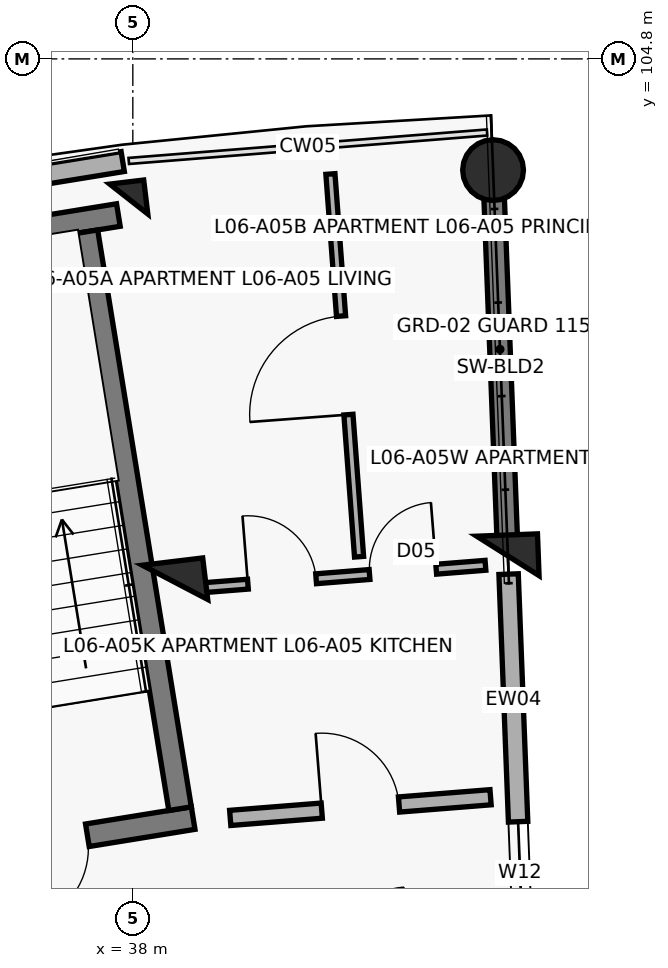
"""IFC4 building model, lengths in metres.
Left out: names, types, materials, properties, quantities, classifications, styles, units other than length and angle.
Written with IfcOpenShell. Run it as: python <this file> out.ifc"""

import sys

from ifc_helpers import new_model, si_unit, direction, frame, frame_2d, origin, origin_2d, place, context, subcontext, project, spatial, rectangle, circle, extrude, element, fill, save


model = new_model("IFC4")
c1 = context("Model", 3, precision=1e-05, world=origin(), true_north=direction((0.0, 1.0)))
c2 = subcontext(c1, "Body", "Model", "MODEL_VIEW")
j1 = project(units=[si_unit("LENGTHUNIT", "METRE"), si_unit("PLANEANGLEUNIT", "RADIAN")], contexts=[c1])
p1 = place(None, origin())
s1 = spatial("IfcSite", under=j1, at=p1, CompositionType="ELEMENT")
p2 = place(p1, origin())
s2 = spatial("IfcBuilding", under=s1, at=p2, CompositionType="ELEMENT")
p3 = place(p2, frame((0.0, 0.0, 20.5)))
s3 = spatial("IfcBuildingStorey", under=s2, at=p3, CompositionType="ELEMENT", Elevation=20.5)
p4 = place(p3, frame((38.555, 97.913, 0.0), z_axis=(0.0, 0.0, 1.0), x_axis=(-0.119790293837, 0.992799217114, 0.0)))
e1 = element("IfcColumn", 1, at=p4, inside=s3, PredefinedType="COLUMN", context=c2, shape_type="SweptSolid", body=[
    extrude(rectangle(XDim=0.55, YDim=0.8, at=origin_2d()), origin(), (0.0, 0.0, 1.0), 3.1),
])
p5 = place(p3, frame((37.947, 102.956, 0.0), z_axis=(0.0, 0.0, 1.0), x_axis=(-0.119790293837, 0.992799217114, 0.0)))
e2 = element("IfcColumn", 2, at=p5, inside=s3, PredefinedType="COLUMN", context=c2, shape_type="SweptSolid", body=[
    extrude(rectangle(XDim=0.45, YDim=0.45, at=origin_2d()), origin(), (0.0, 0.0, 1.0), 3.1),
])
p6 = place(p3, frame((42.935, 98.26, 0.0), z_axis=(0.0, 0.0, 1.0), x_axis=(-0.038387809088, 0.999262916411, 0.0)))
e3 = element("IfcColumn", 3, at=p6, inside=s3, PredefinedType="COLUMN", context=c2, shape_type="SweptSolid", body=[
    extrude(rectangle(XDim=0.55, YDim=0.8, at=origin_2d()), origin(), (0.0, 0.0, 1.0), 3.1),
])
p7 = place(p3, frame((42.74, 103.337, 0.0), z_axis=(0.0, 0.0, 1.0), x_axis=(-0.038387809088, 0.999262916411, 0.0)))
e4 = element("IfcColumn", 4, at=p7, inside=s3, PredefinedType="COLUMN", context=c2, shape_type="SweptSolid", body=[
    extrude(circle(Radius=0.4, at=origin_2d()), origin(), (0.0, 0.0, 1.0), 3.1),
])
p8 = place(p3, frame((42.928, 98.44, 0.0), z_axis=(0.0, 0.0, 1.0), x_axis=(-0.038379487611, 0.999263236055, 0.0)))
e5 = element("IfcWall", 5, at=p8, inside=s3, PredefinedType="SHEAR", context=c2, shape_type="SweptSolid", body=[
    extrude(rectangle(XDim=4.72, YDim=0.27, at=frame_2d((2.36, 0.0))), origin(), (0.0, 0.0, 1.0), 2.86),
])
p9 = place(p3, frame((33.12, 102.679, 0.0), z_axis=(0.0, 0.0, 1.0), x_axis=(0.987080750493, 0.160223568819, 0.0)))
e6 = element("IfcWall", 6, at=p9, inside=s3, PredefinedType="SOLIDWALL", context=c2, shape_type="SweptSolid", body=[
    extrude(rectangle(XDim=4.809, YDim=0.265, at=frame_2d((2.404, 0.0))), origin(), (0.0, 0.0, 1.0), 2.25),
])
p10 = place(p3, frame((43.259, 89.827, 0.0), z_axis=(0.0, 0.0, 1.0), x_axis=(-0.038407966241, 0.999262141847, 0.0)))
e7 = element("IfcWall", 7, at=p10, inside=s3, PredefinedType="SOLIDWALL", context=c2, shape_type="SweptSolid", body=[
    extrude(rectangle(XDim=8.2, YDim=0.255, at=frame_2d((4.1, 0.0))), origin(), (0.0, 0.0, 1.0), 2.18),
])
p11 = place(p10, frame((3.59, 0.0, 0.75)))
e8 = element("IfcOpeningElement", 8, at=p11, cuts=e7, PredefinedType="OPENING", context=c2, shape_type="SweptSolid", body=[
    extrude(rectangle(XDim=1.35, YDim=1.35, at=frame_2d((0.675, 0.675))), frame((0.0, 0.137, 0.0), z_axis=(0.0, -1.0, 0.0), x_axis=(1.0, 0.0, 0.0)), (0.0, 0.0, 1.0), 0.275),
])
p12 = place(p3, frame((38.794, 94.811, 0.0), z_axis=(0.0, 0.0, 1.0), x_axis=(-0.987077443397, -0.160243941341, 0.0)))
e9 = element("IfcWall", 9, at=p12, inside=s3, PredefinedType="SHEAR", context=c2, shape_type="SweptSolid", body=[
    extrude(rectangle(XDim=3.87, YDim=0.3, at=frame_2d((1.935, 0.0))), origin(), (0.0, 0.0, 1.0), 3.1),
])
p13 = place(p12, frame((1.41, 0.0, 0.0)))
e10 = element("IfcOpeningElement", 10, at=p13, cuts=e9, PredefinedType="OPENING", context=c2, shape_type="SweptSolid", body=[
    extrude(rectangle(XDim=1.05, YDim=2.15, at=frame_2d((0.525, 1.075))), frame((0.0, 0.16, 0.0), z_axis=(0.0, -1.0, 0.0), x_axis=(1.0, 0.0, 0.0)), (0.0, 0.0, 1.0), 0.32),
])
p14 = place(p3, frame((37.81, 102.745, 0.0), z_axis=(0.0, 0.0, 1.0), x_axis=(-0.987084710126, -0.160199173019, 0.0)))
e11 = element("IfcWall", 11, at=p14, inside=s3, PredefinedType="SHEAR", context=c2, shape_type="SweptSolid", body=[
    extrude(rectangle(XDim=4.47, YDim=0.3, at=frame_2d((2.235, 0.0))), origin(), (0.0, 0.0, 1.0), 3.1),
])
p15 = place(p3, frame((38.622, 94.935, 0.0), z_axis=(0.0, 0.0, 1.0), x_axis=(-0.160196564502, 0.987085133472, 0.0)))
e12 = element("IfcWall", 12, at=p15, inside=s3, PredefinedType="SHEAR", context=c2, shape_type="SweptSolid", body=[
    extrude(rectangle(XDim=7.69, YDim=0.3, at=frame_2d((3.845, 0.0))), origin(), (0.0, 0.0, 1.0), 3.1),
])
p16 = place(p3, frame((39.281, 94.813, 0.0), z_axis=(0.0, 0.0, 1.0), x_axis=(0.996862545573, 0.079152165058, 0.0)))
e13 = element("IfcWall", 13, at=p16, inside=s3, PredefinedType="SOLIDWALL", context=c2, shape_type="SweptSolid", body=[
    extrude(rectangle(XDim=3.436, YDim=0.2, at=frame_2d((1.718, 0.0))), origin(), (0.0, 0.0, 1.0), 2.08),
])
p17 = place(p16, frame((1.208, 0.0, 0.0)))
e14 = element("IfcOpeningElement", 14, at=p17, cuts=e13, PredefinedType="OPENING", context=c2, shape_type="SweptSolid", body=[
    extrude(rectangle(XDim=1.02, YDim=2.15, at=frame_2d((0.51, 1.075))), frame((0.0, 0.11, 0.0), z_axis=(0.0, -1.0, 0.0), x_axis=(1.0, 0.0, 0.0)), (0.0, 0.0, 1.0), 0.22),
])
p18 = place(p3, frame((38.866, 97.837, 0.0), z_axis=(0.0, 0.0, 1.0), x_axis=(0.996863292793, 0.079142753818, 0.0)))
e15 = element("IfcWall", 15, at=p18, inside=s3, PredefinedType="PARTITIONING", context=c2, shape_type="SweptSolid", body=[
    extrude(rectangle(XDim=3.785, YDim=0.13, at=frame_2d((1.893, 0.0))), origin(), (0.0, 0.0, 1.0), 2.08),
])
p19 = place(p18, frame((0.65, 0.0, 0.0)))
e16 = element("IfcOpeningElement", 16, at=p19, cuts=e15, PredefinedType="OPENING", context=c2, shape_type="SweptSolid", body=[
    extrude(rectangle(XDim=0.9, YDim=2.1, at=frame_2d((0.45, 1.05))), frame((0.0, 0.075, 0.0), z_axis=(0.0, -1.0, 0.0), x_axis=(1.0, 0.0, 0.0)), (0.0, 0.0, 1.0), 0.15),
])
p20 = place(p18, frame((2.255, 0.0, 0.0)))
e17 = element("IfcOpeningElement", 17, at=p20, cuts=e15, PredefinedType="OPENING", context=c2, shape_type="SweptSolid", body=[
    extrude(rectangle(XDim=0.88, YDim=2.1, at=frame_2d((0.44, 1.05))), frame((0.0, 0.075, 0.0), z_axis=(0.0, -1.0, 0.0), x_axis=(1.0, 0.0, 0.0)), (0.0, 0.0, 1.0), 0.15),
])
p21 = place(p3, frame((40.977, 98.25, 0.0), z_axis=(0.0, 0.0, 1.0), x_axis=(-0.074640923707, 0.997210475531, 0.0)))
e18 = element("IfcWall", 18, at=p21, inside=s3, PredefinedType="PARTITIONING", context=c2, shape_type="SweptSolid", body=[
    extrude(rectangle(XDim=5.05, YDim=0.12, at=frame_2d((2.525, 0.0))), origin(), (0.0, 0.0, 1.0), 2.08),
])
p22 = place(p21, frame((1.875, 0.0, 0.0)))
e19 = element("IfcOpeningElement", 19, at=p22, cuts=e18, PredefinedType="OPENING", context=c2, shape_type="SweptSolid", body=[
    extrude(rectangle(XDim=1.3, YDim=2.1, at=frame_2d((0.65, 1.05))), frame((0.0, 0.07, 0.0), z_axis=(0.0, -1.0, 0.0), x_axis=(1.0, 0.0, 0.0)), (0.0, 0.0, 1.0), 0.14),
])
p23 = place(p11, origin())
e20 = element("IfcWindow", 20, at=p23, inside=s3, PartitioningType="DOUBLE_PANEL_VERTICAL", PredefinedType="WINDOW", context=c2, shape_type="SweptSolid", body=[
    extrude(rectangle(XDim=1.35, YDim=1.35, at=frame_2d((0.675, 0.675))), frame((0.0, 0.03, 0.0), z_axis=(0.0, -1.0, 0.0), x_axis=(1.0, 0.0, 0.0)), (0.0, 0.0, 1.0), 0.06),
])
fill(e8, e20)
p24 = place(p13, origin())
e21 = element("IfcDoor", 21, at=p24, inside=s3, OperationType="SINGLE_SWING_RIGHT", PredefinedType="DOOR", context=c2, shape_type="SweptSolid", body=[
    extrude(rectangle(XDim=1.05, YDim=2.15, at=frame_2d((0.525, 1.075))), frame((0.0, 0.025, 0.0), z_axis=(0.0, -1.0, 0.0), x_axis=(1.0, 0.0, 0.0)), (0.0, 0.0, 1.0), 0.05),
])
fill(e10, e21)
p25 = place(p17, origin())
e22 = element("IfcDoor", 22, at=p25, inside=s3, OperationType="SINGLE_SWING_LEFT", PredefinedType="DOOR", context=c2, shape_type="SweptSolid", body=[
    extrude(rectangle(XDim=1.02, YDim=2.15, at=frame_2d((0.51, 1.075))), frame((0.0, 0.025, 0.0), z_axis=(0.0, -1.0, 0.0), x_axis=(1.0, 0.0, 0.0)), (0.0, 0.0, 1.0), 0.05),
])
fill(e14, e22)
p26 = place(p19, origin())
e23 = element("IfcDoor", 23, at=p26, inside=s3, OperationType="SINGLE_SWING_LEFT", PredefinedType="DOOR", context=c2, shape_type="SweptSolid", body=[
    extrude(rectangle(XDim=0.9, YDim=2.1, at=frame_2d((0.45, 1.05))), frame((0.0, 0.025, 0.0), z_axis=(0.0, -1.0, 0.0), x_axis=(1.0, 0.0, 0.0)), (0.0, 0.0, 1.0), 0.05),
])
fill(e16, e23)
p27 = place(p20, origin())
e24 = element("IfcDoor", 24, at=p27, inside=s3, OperationType="SINGLE_SWING_RIGHT", PredefinedType="DOOR", context=c2, shape_type="SweptSolid", body=[
    extrude(rectangle(XDim=0.88, YDim=2.1, at=frame_2d((0.44, 1.05))), frame((0.0, 0.025, 0.0), z_axis=(0.0, -1.0, 0.0), x_axis=(1.0, 0.0, 0.0)), (0.0, 0.0, 1.0), 0.05),
])
fill(e17, e24)
p28 = place(p22, origin())
e25 = element("IfcDoor", 25, at=p28, inside=s3, OperationType="SINGLE_SWING_LEFT", PredefinedType="DOOR", context=c2, shape_type="SweptSolid", body=[
    extrude(rectangle(XDim=1.3, YDim=2.1, at=frame_2d((0.65, 1.05))), frame((0.0, 0.025, 0.0), z_axis=(0.0, -1.0, 0.0), x_axis=(1.0, 0.0, 0.0)), (0.0, 0.0, 1.0), 0.05),
])
fill(e19, e25)
save(model, sys.argv[1])
